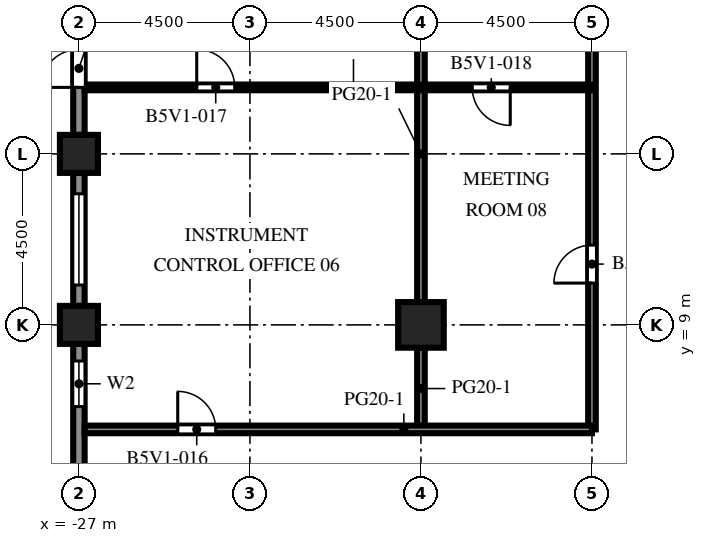
"""IFC4 building model, lengths in metres.
Left out: names, types, materials, properties, quantities, classifications, styles, units other than length and angle.
Written with IfcOpenShell. Run it as: python <this file> out.ifc"""

import sys

from ifc_helpers import new_model, si_unit, direction, frame, frame_2d, origin, origin_2d, place, context, subcontext, project, spatial, rectangle, extrude, element, fill, save


model = new_model("IFC4")
c1 = context("Model", 3, precision=1e-05, world=origin(), true_north=direction((0.0, 1.0)))
c2 = subcontext(c1, "Body", "Model", "MODEL_VIEW")
j1 = project(units=[si_unit("LENGTHUNIT", "METRE"), si_unit("PLANEANGLEUNIT", "RADIAN")], contexts=[c1])
p1 = place(None, origin())
s1 = spatial("IfcSite", under=j1, at=p1, CompositionType="ELEMENT")
p2 = place(p1, origin())
s2 = spatial("IfcBuilding", under=s1, at=p2, CompositionType="ELEMENT")
p3 = place(p2, frame((0.0, 0.0, 165.0)))
s3 = spatial("IfcBuildingStorey", under=s2, at=p3, CompositionType="ELEMENT", Elevation=165.0)
for number, where, z_axis, x_axis in (
    (1, (-27.0, 9.0, 0.0), (0.0, 0.0, 1.0), (1.0, 0.0, 0.0)),
    (2, (-27.0, 13.5, 0.0), (0.0, 0.0, 1.0), (1.0, 0.0, 0.0)),
):
    element("IfcColumn", number, at=place(p3, frame(where, z_axis=z_axis, x_axis=x_axis)), inside=s3, PredefinedType="COLUMN", context=c2, shape_type="SweptSolid", body=[
        extrude(rectangle(XDim=1.0, YDim=1.0, at=origin_2d()), origin(), (0.0, 0.0, 1.0), 4.1),
    ])
p4 = place(p3, frame((-18.0, 9.0, 0.0), z_axis=(0.0, 0.0, 1.0), x_axis=(1.0, 0.0, 0.0)))
e3 = element("IfcColumn", 3, at=p4, inside=s3, PredefinedType="COLUMN", context=c2, shape_type="SweptSolid", body=[
    extrude(rectangle(XDim=1.2, YDim=1.2, at=origin_2d()), origin(), (0.0, 0.0, 1.0), 4.1),
])
p5 = place(p3, frame((-27.0, 14.0, 0.0), z_axis=(0.0, 0.0, 1.0), x_axis=(0.0, 1.0, 0.0)))
e4 = element("IfcWall", 4, at=p5, inside=s3, PredefinedType="SOLIDWALL", context=c2, shape_type="SweptSolid", body=[
    extrude(rectangle(XDim=3.5, YDim=0.3, at=frame_2d((1.75, 0.0))), origin(), (0.0, 0.0, 1.0), 2.85),
])
p6 = place(p5, frame((1.25, 0.0, 0.0)))
e5 = element("IfcOpeningElement", 5, at=p6, cuts=e4, PredefinedType="OPENING", context=c2, shape_type="SweptSolid", body=[
    extrude(rectangle(XDim=1.0, YDim=2.2, at=frame_2d((0.5, 1.1))), frame((0.0, 0.16, 0.0), z_axis=(0.0, -1.0, 0.0), x_axis=(1.0, 0.0, 0.0)), (0.0, 0.0, 1.0), 0.32),
])
p7 = place(p3, frame((-27.0, 9.5, 0.0), z_axis=(0.0, 0.0, 1.0), x_axis=(0.0, 1.0, 0.0)))
e6 = element("IfcWall", 6, at=p7, inside=s3, PredefinedType="SOLIDWALL", context=c2, shape_type="SweptSolid", body=[
    extrude(rectangle(XDim=3.5, YDim=0.3, at=frame_2d((1.75, 0.0))), origin(), (0.0, 0.0, 1.0), 2.85),
])
p8 = place(p7, frame((0.55, 0.0, 0.8)))
e7 = element("IfcOpeningElement", 7, at=p8, cuts=e6, PredefinedType="OPENING", context=c2, shape_type="SweptSolid", body=[
    extrude(rectangle(XDim=2.4, YDim=1.7, at=frame_2d((1.2, 0.85))), frame((0.0, 0.16, 0.0), z_axis=(0.0, -1.0, 0.0), x_axis=(1.0, 0.0, 0.0)), (0.0, 0.0, 1.0), 0.32),
])
p9 = place(p3, frame((-27.0, 5.0, 0.0), z_axis=(0.0, 0.0, 1.0), x_axis=(0.0, 1.0, 0.0)))
e8 = element("IfcWall", 8, at=p9, inside=s3, PredefinedType="SOLIDWALL", context=c2, shape_type="SweptSolid", body=[
    extrude(rectangle(XDim=3.5, YDim=0.3, at=frame_2d((1.75, 0.0))), origin(), (0.0, 0.0, 1.0), 2.85),
])
p10 = place(p9, frame((1.85, 0.0, 0.8)))
e9 = element("IfcOpeningElement", 9, at=p10, cuts=e8, PredefinedType="OPENING", context=c2, shape_type="SweptSolid", body=[
    extrude(rectangle(XDim=1.2, YDim=1.7, at=frame_2d((0.6, 0.85))), frame((0.0, 0.16, 0.0), z_axis=(0.0, -1.0, 0.0), x_axis=(1.0, 0.0, 0.0)), (0.0, 0.0, 1.0), 0.32),
])
p11 = place(p3, frame((-18.0, 6.25, 0.0), z_axis=(0.0, 0.0, 1.0), x_axis=(0.0, 1.0, 0.0)))
e10 = element("IfcWall", 10, at=p11, inside=s3, PredefinedType="PARTITIONING", context=c2, shape_type="SweptSolid", body=[
    extrude(rectangle(XDim=2.15, YDim=0.2, at=frame_2d((1.075, 0.0))), origin(), (0.0, 0.0, 1.0), 3.65),
])
p12 = place(p3, frame((-18.0, 9.6, 0.0), z_axis=(0.0, 0.0, 1.0), x_axis=(0.0, 1.0, 0.0)))
e11 = element("IfcWall", 11, at=p12, inside=s3, PredefinedType="PARTITIONING", context=c2, shape_type="SweptSolid", body=[
    extrude(rectangle(XDim=7.8, YDim=0.2, at=frame_2d((3.9, 0.0))), origin(), (0.0, 0.0, 1.0), 3.65),
])
p13 = place(p3, frame((-13.5, 6.25, 0.0), z_axis=(0.0, 0.0, 1.0), x_axis=(0.0, 1.0, 0.0)))
e12 = element("IfcWall", 12, at=p13, inside=s3, PredefinedType="PARTITIONING", context=c2, shape_type="SweptSolid", body=[
    extrude(rectangle(XDim=20.25, YDim=0.2, at=frame_2d((10.125, 0.0))), origin(), (0.0, 0.0, 1.0), 3.65),
])
p14 = place(p13, frame((3.85, 0.0, 0.0)))
e13 = element("IfcOpeningElement", 13, at=p14, cuts=e12, PredefinedType="OPENING", context=c2, shape_type="SweptSolid", body=[
    extrude(rectangle(XDim=1.0, YDim=2.1, at=frame_2d((0.5, 1.05))), frame((0.0, 0.11, 0.0), z_axis=(0.0, -1.0, 0.0), x_axis=(1.0, 0.0, 0.0)), (0.0, 0.0, 1.0), 0.22),
])
p15 = place(p3, frame((-26.85, 6.25, 0.0), z_axis=(0.0, 0.0, 1.0), x_axis=(1.0, 0.0, 0.0)))
e14 = element("IfcWall", 14, at=p15, inside=s3, PredefinedType="PARTITIONING", context=c2, shape_type="SweptSolid", body=[
    extrude(rectangle(XDim=13.35, YDim=0.2, at=frame_2d((6.675, 0.0))), origin(), (0.0, 0.0, 1.0), 3.65),
])
p16 = place(p15, frame((2.45, 0.0, 0.0)))
e15 = element("IfcOpeningElement", 15, at=p16, cuts=e14, PredefinedType="OPENING", context=c2, shape_type="SweptSolid", body=[
    extrude(rectangle(XDim=1.0, YDim=2.1, at=frame_2d((0.5, 1.05))), frame((0.0, 0.11, 0.0), z_axis=(0.0, -1.0, 0.0), x_axis=(1.0, 0.0, 0.0)), (0.0, 0.0, 1.0), 0.22),
])
p17 = place(p3, frame((-26.85, 15.25, 0.0), z_axis=(0.0, 0.0, 1.0), x_axis=(1.0, 0.0, 0.0)))
e16 = element("IfcWall", 16, at=p17, inside=s3, PredefinedType="PARTITIONING", context=c2, shape_type="SweptSolid", body=[
    extrude(rectangle(XDim=13.35, YDim=0.15, at=frame_2d((6.675, 0.0))), origin(), (0.0, 0.0, 1.0), 3.65),
])
p18 = place(p17, frame((2.95, 0.0, 0.0)))
e17 = element("IfcOpeningElement", 17, at=p18, cuts=e16, PredefinedType="OPENING", context=c2, shape_type="SweptSolid", body=[
    extrude(rectangle(XDim=1.0, YDim=2.1, at=frame_2d((0.5, 1.05))), frame((0.0, 0.085, 0.0), z_axis=(0.0, -1.0, 0.0), x_axis=(1.0, 0.0, 0.0)), (0.0, 0.0, 1.0), 0.17),
])
p19 = place(p17, frame((10.2, 0.0, 0.0)))
e18 = element("IfcOpeningElement", 18, at=p19, cuts=e16, PredefinedType="OPENING", context=c2, shape_type="SweptSolid", body=[
    extrude(rectangle(XDim=1.0, YDim=2.1, at=frame_2d((0.5, 1.05))), frame((0.0, 0.085, 0.0), z_axis=(0.0, -1.0, 0.0), x_axis=(1.0, 0.0, 0.0)), (0.0, 0.0, 1.0), 0.17),
])
p20 = place(p6, origin())
e19 = element("IfcDoor", 19, at=p20, inside=s3, OperationType="SINGLE_SWING_LEFT", PredefinedType="DOOR", context=c2, shape_type="SweptSolid", body=[
    extrude(rectangle(XDim=1.0, YDim=2.2, at=frame_2d((0.5, 1.1))), frame((0.0, 0.025, 0.0), z_axis=(0.0, -1.0, 0.0), x_axis=(1.0, 0.0, 0.0)), (0.0, 0.0, 1.0), 0.05),
])
fill(e5, e19)
p21 = place(p8, origin())
e20 = element("IfcWindow", 20, at=p21, inside=s3, PartitioningType="SINGLE_PANEL", PredefinedType="WINDOW", context=c2, shape_type="SweptSolid", body=[
    extrude(rectangle(XDim=2.4, YDim=1.7, at=frame_2d((1.2, 0.85))), frame((0.0, 0.03, 0.0), z_axis=(0.0, -1.0, 0.0), x_axis=(1.0, 0.0, 0.0)), (0.0, 0.0, 1.0), 0.06),
])
fill(e7, e20)
p22 = place(p10, origin())
e21 = element("IfcWindow", 21, at=p22, inside=s3, PartitioningType="SINGLE_PANEL", PredefinedType="WINDOW", context=c2, shape_type="SweptSolid", body=[
    extrude(rectangle(XDim=1.2, YDim=1.7, at=frame_2d((0.6, 0.85))), frame((0.0, 0.03, 0.0), z_axis=(0.0, -1.0, 0.0), x_axis=(1.0, 0.0, 0.0)), (0.0, 0.0, 1.0), 0.06),
])
fill(e9, e21)
p23 = place(p14, origin())
e22 = element("IfcDoor", 22, at=p23, inside=s3, OperationType="SINGLE_SWING_LEFT", PredefinedType="DOOR", context=c2, shape_type="SweptSolid", body=[
    extrude(rectangle(XDim=1.0, YDim=2.1, at=frame_2d((0.5, 1.05))), frame((0.0, 0.025, 0.0), z_axis=(0.0, -1.0, 0.0), x_axis=(1.0, 0.0, 0.0)), (0.0, 0.0, 1.0), 0.05),
])
fill(e13, e22)
p24 = place(p16, origin())
e23 = element("IfcDoor", 23, at=p24, inside=s3, OperationType="SINGLE_SWING_LEFT", PredefinedType="DOOR", context=c2, shape_type="SweptSolid", body=[
    extrude(rectangle(XDim=1.0, YDim=2.1, at=frame_2d((0.5, 1.05))), frame((0.0, 0.025, 0.0), z_axis=(0.0, -1.0, 0.0), x_axis=(1.0, 0.0, 0.0)), (0.0, 0.0, 1.0), 0.05),
])
fill(e15, e23)
p25 = place(p18, origin())
e24 = element("IfcDoor", 24, at=p25, inside=s3, OperationType="SINGLE_SWING_LEFT", PredefinedType="DOOR", context=c2, shape_type="SweptSolid", body=[
    extrude(rectangle(XDim=1.0, YDim=2.1, at=frame_2d((0.5, 1.05))), frame((0.0, 0.025, 0.0), z_axis=(0.0, -1.0, 0.0), x_axis=(1.0, 0.0, 0.0)), (0.0, 0.0, 1.0), 0.05),
])
fill(e17, e24)
p26 = place(p19, origin())
e25 = element("IfcDoor", 25, at=p26, inside=s3, OperationType="SINGLE_SWING_RIGHT", PredefinedType="DOOR", context=c2, shape_type="SweptSolid", body=[
    extrude(rectangle(XDim=1.0, YDim=2.1, at=frame_2d((0.5, 1.05))), frame((0.0, 0.025, 0.0), z_axis=(0.0, -1.0, 0.0), x_axis=(1.0, 0.0, 0.0)), (0.0, 0.0, 1.0), 0.05),
])
fill(e18, e25)
save(model, sys.argv[1])
